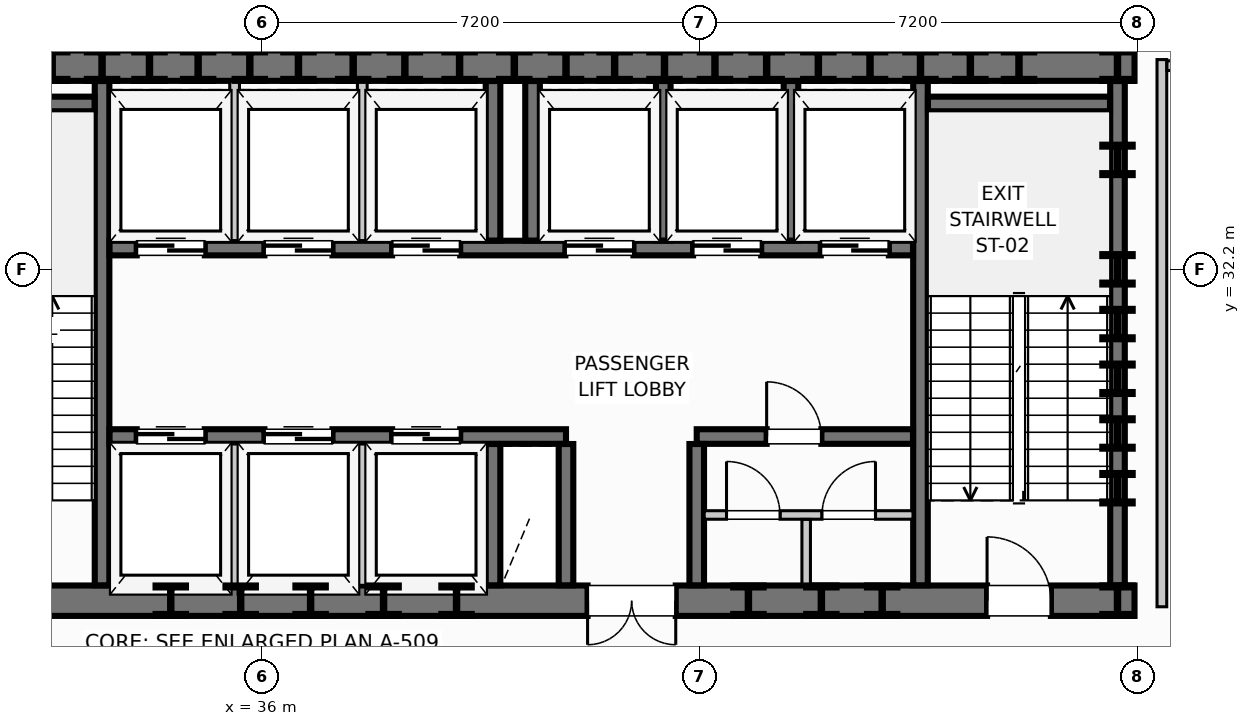
"""IFC4 building model, lengths in metres.
Left out: names, types, materials, properties, quantities, classifications, styles, units other than length and angle.
Written with IfcOpenShell. Run it as: python <this file> out.ifc"""

import sys

from ifc_helpers import new_model, si_unit, direction, frame, frame_2d, origin, origin_2d, place, context, subcontext, project, spatial, rectangle, i_section, extrude, element, fill, save


model = new_model("IFC4")
c1 = context("Model", 3, precision=1e-05, world=origin(), true_north=direction((0.0, 1.0)))
c2 = subcontext(c1, "Body", "Model", "MODEL_VIEW")
j1 = project(units=[si_unit("LENGTHUNIT", "METRE"), si_unit("PLANEANGLEUNIT", "RADIAN")], contexts=[c1])
p1 = place(None, origin())
s1 = spatial("IfcSite", under=j1, at=p1, CompositionType="ELEMENT")
p2 = place(p1, origin())
s2 = spatial("IfcBuilding", under=s1, at=p2, CompositionType="ELEMENT")
p3 = place(p2, frame((0.0, 0.0, 105.95)))
s3 = spatial("IfcBuildingStorey", under=s2, at=p3, CompositionType="ELEMENT", Elevation=105.95)
for number, where, z_axis, x_axis in (
    (1, (33.37, 35.55, 0.0), (0.0, 0.0, 1.0), (1.0, 0.0, 0.0)),
    (2, (34.95, 35.55, 0.0), (0.0, 0.0, 1.0), (1.0, 0.0, 0.0)),
    (3, (36.6, 35.55, 0.0), (0.0, 0.0, 1.0), (1.0, 0.0, 0.0)),
    (4, (38.35, 35.55, 0.0), (0.0, 0.0, 1.0), (1.0, 0.0, 0.0)),
    (5, (40.15, 35.55, 0.0), (0.0, 0.0, 1.0), (1.0, 0.0, 0.0)),
    (6, (41.8, 35.55, 0.0), (0.0, 0.0, 1.0), (1.0, 0.0, 0.0)),
    (7, (43.45, 35.55, 0.0), (0.0, 0.0, 1.0), (1.0, 0.0, 0.0)),
    (8, (45.15, 35.55, 0.0), (0.0, 0.0, 1.0), (1.0, 0.0, 0.0)),
    (9, (46.83, 35.55, 0.0), (0.0, 0.0, 1.0), (1.0, 0.0, 0.0)),
    (10, (48.45, 35.55, 0.0), (0.0, 0.0, 1.0), (1.0, 0.0, 0.0)),
    (11, (50.07, 35.55, 0.0), (0.0, 0.0, 1.0), (1.0, 0.0, 0.0)),
    (12, (34.5, 26.75, 0.0), (0.0, 0.0, 1.0), (1.0, 0.0, 0.0)),
    (13, (36.8, 26.75, 0.0), (0.0, 0.0, 1.0), (1.0, 0.0, 0.0)),
    (14, (39.2, 26.75, 0.0), (0.0, 0.0, 1.0), (1.0, 0.0, 0.0)),
    (15, (45.2, 26.75, 0.0), (0.0, 0.0, 1.0), (1.0, 0.0, 0.0)),
    (16, (50.07, 26.75, 0.0), (0.0, 0.0, 1.0), (1.0, 0.0, 0.0)),
    (17, (50.07, 28.6, 0.0), (0.0, 0.0, 1.0), (1.0, 0.0, 0.0)),
    (18, (50.07, 30.4, 0.0), (0.0, 0.0, 1.0), (1.0, 0.0, 0.0)),
    (19, (50.07, 32.2, 0.0), (0.0, 0.0, 1.0), (1.0, 0.0, 0.0)),
    (20, (50.07, 34.0, 0.0), (0.0, 0.0, 1.0), (1.0, 0.0, 0.0)),
    (21, (32.55, 35.55, 0.0), (0.0, 0.0, 1.0), (1.0, 0.0, 0.0)),
    (22, (37.5, 35.55, 0.0), (0.0, 0.0, 1.0), (1.0, 0.0, 0.0)),
    (23, (42.62, 35.55, 0.0), (0.0, 0.0, 1.0), (1.0, 0.0, 0.0)),
    (24, (47.65, 35.55, 0.0), (0.0, 0.0, 1.0), (1.0, 0.0, 0.0)),
    (25, (34.15, 35.55, 0.0), (0.0, 0.0, 1.0), (1.0, 0.0, 0.0)),
    (26, (35.8, 35.55, 0.0), (0.0, 0.0, 1.0), (1.0, 0.0, 0.0)),
    (27, (39.25, 35.55, 0.0), (0.0, 0.0, 1.0), (1.0, 0.0, 0.0)),
    (28, (41.0, 35.55, 0.0), (0.0, 0.0, 1.0), (1.0, 0.0, 0.0)),
    (29, (44.3, 35.55, 0.0), (0.0, 0.0, 1.0), (1.0, 0.0, 0.0)),
    (30, (46.0, 35.55, 0.0), (0.0, 0.0, 1.0), (1.0, 0.0, 0.0)),
    (31, (50.07, 29.5, 0.0), (0.0, 0.0, 1.0), (1.0, 0.0, 0.0)),
    (32, (50.07, 31.3, 0.0), (0.0, 0.0, 1.0), (1.0, 0.0, 0.0)),
    (33, (35.65, 26.75, 0.0), (0.0, 0.0, 1.0), (1.0, 0.0, 0.0)),
    (34, (38.0, 26.75, 0.0), (0.0, 0.0, 1.0), (1.0, 0.0, 0.0)),
    (35, (44.0, 26.75, 0.0), (0.0, 0.0, 1.0), (1.0, 0.0, 0.0)),
    (36, (46.2, 26.75, 0.0), (0.0, 0.0, 1.0), (1.0, 0.0, 0.0)),
):
    element("IfcColumn", number, at=place(p3, frame(where, z_axis=z_axis, x_axis=x_axis)), inside=s3, PredefinedType="COLUMN", context=c2, shape_type="SweptSolid", body=[
        extrude(i_section(OverallWidth=0.5, OverallDepth=0.5, WebThickness=0.022, FlangeThickness=0.032, at=origin_2d()), origin(), (0.0, 0.0, 1.0), 4.5),
    ])
p4 = place(p3, frame((21.65, 26.75, 0.0), z_axis=(0.0, 0.0, 1.0), x_axis=(1.0, 0.0, 0.0)))
e37 = element("IfcWall", 37, at=p4, inside=s3, PredefinedType="SHEAR", context=c2, shape_type="SweptSolid", body=[
    extrude(rectangle(XDim=28.7, YDim=0.5, at=frame_2d((14.35, 0.0))), origin(), (0.0, 0.0, 1.0), 4.5),
])
p5 = place(p4, frame((1.375, 0.0, 0.0)))
e38 = element("IfcOpeningElement", 38, at=p5, cuts=e37, PredefinedType="OPENING", context=c2, shape_type="SweptSolid", body=[
    extrude(rectangle(XDim=1.05, YDim=2.0, at=frame_2d((0.525, 1.0))), frame((0.0, 0.26, 0.0), z_axis=(0.0, -1.0, 0.0), x_axis=(1.0, 0.0, 0.0)), (0.0, 0.0, 1.0), 0.52),
])
p6 = place(p4, frame((5.375, 0.0, 0.0)))
e39 = element("IfcOpeningElement", 39, at=p6, cuts=e37, PredefinedType="OPENING", context=c2, shape_type="SweptSolid", body=[
    extrude(rectangle(XDim=1.05, YDim=2.0, at=frame_2d((0.525, 1.0))), frame((0.0, 0.26, 0.0), z_axis=(0.0, -1.0, 0.0), x_axis=(1.0, 0.0, 0.0)), (0.0, 0.0, 1.0), 0.52),
])
p7 = place(p4, frame((9.575, 0.0, 0.0)))
e40 = element("IfcOpeningElement", 40, at=p7, cuts=e37, PredefinedType="OPENING", context=c2, shape_type="SweptSolid", body=[
    extrude(rectangle(XDim=1.05, YDim=2.0, at=frame_2d((0.525, 1.0))), frame((0.0, 0.26, 0.0), z_axis=(0.0, -1.0, 0.0), x_axis=(1.0, 0.0, 0.0)), (0.0, 0.0, 1.0), 0.52),
])
p8 = place(p4, frame((19.705, 0.0, 0.0)))
e41 = element("IfcOpeningElement", 41, at=p8, cuts=e37, PredefinedType="OPENING", context=c2, shape_type="SweptSolid", body=[
    extrude(rectangle(XDim=1.45, YDim=2.0, at=frame_2d((0.725, 1.0))), frame((0.0, 0.26, 0.0), z_axis=(0.0, -1.0, 0.0), x_axis=(1.0, 0.0, 0.0)), (0.0, 0.0, 1.0), 0.52),
])
p9 = place(p4, frame((26.275, 0.0, 0.0)))
e42 = element("IfcOpeningElement", 42, at=p9, cuts=e37, PredefinedType="OPENING", context=c2, shape_type="SweptSolid", body=[
    extrude(rectangle(XDim=1.05, YDim=2.0, at=frame_2d((0.525, 1.0))), frame((0.0, 0.26, 0.0), z_axis=(0.0, -1.0, 0.0), x_axis=(1.0, 0.0, 0.0)), (0.0, 0.0, 1.0), 0.52),
])
p10 = place(p3, frame((50.35, 35.55, 0.0), z_axis=(0.0, 0.0, 1.0), x_axis=(-1.0, 0.0, 0.0)))
e43 = element("IfcWall", 43, at=p10, inside=s3, PredefinedType="SHEAR", context=c2, shape_type="SweptSolid", body=[
    extrude(rectangle(XDim=28.7, YDim=0.5, at=frame_2d((14.35, 0.0))), origin(), (0.0, 0.0, 1.0), 4.5),
])
for number, where, z_axis, x_axis in (
    (44, (50.07, 27.003, 0.0), (0.0, 0.0, 1.0), (0.0, 1.0, 0.0)),
    (45, (33.37, 27.003, 0.0), (0.0, 0.0, 1.0), (0.0, 1.0, 0.0)),
):
    element("IfcWall", number, at=place(p3, frame(where, z_axis=z_axis, x_axis=x_axis)), inside=s3, PredefinedType="SHEAR", context=c2, shape_type="SweptSolid", body=[
        extrude(rectangle(XDim=8.294, YDim=0.24, at=frame_2d((4.147, 0.0))), origin(), (0.0, 0.0, 1.0), 4.5),
    ])
p11 = place(p3, frame((30.253, 34.92, 0.0), z_axis=(0.0, 0.0, 1.0), x_axis=(1.0, 0.0, 0.0)))
e46 = element("IfcWall", 46, at=p11, inside=s3, PredefinedType="SHEAR", context=c2, shape_type="SweptSolid", body=[
    extrude(rectangle(XDim=2.994, YDim=0.24, at=frame_2d((1.497, 0.0))), origin(), (0.0, 0.0, 1.0), 4.5),
])
p12 = place(p3, frame((46.83, 27.003, 0.0), z_axis=(0.0, 0.0, 1.0), x_axis=(0.0, 1.0, 0.0)))
e47 = element("IfcWall", 47, at=p12, inside=s3, PredefinedType="SHEAR", context=c2, shape_type="SweptSolid", body=[
    extrude(rectangle(XDim=8.294, YDim=0.24, at=frame_2d((4.147, 0.0))), origin(), (0.0, 0.0, 1.0), 4.5),
])
p13 = place(p3, frame((46.953, 34.92, 0.0), z_axis=(0.0, 0.0, 1.0), x_axis=(1.0, 0.0, 0.0)))
e48 = element("IfcWall", 48, at=p13, inside=s3, PredefinedType="SHEAR", context=c2, shape_type="SweptSolid", body=[
    extrude(rectangle(XDim=2.994, YDim=0.24, at=frame_2d((1.497, 0.0))), origin(), (0.0, 0.0, 1.0), 4.5),
])
p14 = place(p3, frame((33.493, 32.55, 0.0), z_axis=(0.0, 0.0, 1.0), x_axis=(1.0, 0.0, 0.0)))
e49 = element("IfcWall", 49, at=p14, inside=s3, PredefinedType="SHEAR", context=c2, shape_type="SweptSolid", body=[
    extrude(rectangle(XDim=13.214, YDim=0.24, at=frame_2d((6.607, 0.0))), origin(), (0.0, 0.0, 1.0), 4.5),
])
p15 = place(p14, frame((0.447, 0.0, 0.0)))
e50 = element("IfcOpeningElement", 50, at=p15, cuts=e49, PredefinedType="OPENING", context=c2, shape_type="SweptSolid", body=[
    extrude(rectangle(XDim=1.12, YDim=2.0, at=frame_2d((0.56, 1.0))), frame((0.0, 0.13, 0.0), z_axis=(0.0, -1.0, 0.0), x_axis=(1.0, 0.0, 0.0)), (0.0, 0.0, 1.0), 0.26),
])
p16 = place(p14, frame((2.547, 0.0, 0.0)))
e51 = element("IfcOpeningElement", 51, at=p16, cuts=e49, PredefinedType="OPENING", context=c2, shape_type="SweptSolid", body=[
    extrude(rectangle(XDim=1.12, YDim=2.0, at=frame_2d((0.56, 1.0))), frame((0.0, 0.13, 0.0), z_axis=(0.0, -1.0, 0.0), x_axis=(1.0, 0.0, 0.0)), (0.0, 0.0, 1.0), 0.26),
])
p17 = place(p14, frame((4.647, 0.0, 0.0)))
e52 = element("IfcOpeningElement", 52, at=p17, cuts=e49, PredefinedType="OPENING", context=c2, shape_type="SweptSolid", body=[
    extrude(rectangle(XDim=1.12, YDim=2.0, at=frame_2d((0.56, 1.0))), frame((0.0, 0.13, 0.0), z_axis=(0.0, -1.0, 0.0), x_axis=(1.0, 0.0, 0.0)), (0.0, 0.0, 1.0), 0.26),
])
p18 = place(p14, frame((7.497, 0.0, 0.0)))
e53 = element("IfcOpeningElement", 53, at=p18, cuts=e49, PredefinedType="OPENING", context=c2, shape_type="SweptSolid", body=[
    extrude(rectangle(XDim=1.12, YDim=2.0, at=frame_2d((0.56, 1.0))), frame((0.0, 0.13, 0.0), z_axis=(0.0, -1.0, 0.0), x_axis=(1.0, 0.0, 0.0)), (0.0, 0.0, 1.0), 0.26),
])
p19 = place(p14, frame((9.597, 0.0, 0.0)))
e54 = element("IfcOpeningElement", 54, at=p19, cuts=e49, PredefinedType="OPENING", context=c2, shape_type="SweptSolid", body=[
    extrude(rectangle(XDim=1.12, YDim=2.0, at=frame_2d((0.56, 1.0))), frame((0.0, 0.13, 0.0), z_axis=(0.0, -1.0, 0.0), x_axis=(1.0, 0.0, 0.0)), (0.0, 0.0, 1.0), 0.26),
])
p20 = place(p14, frame((11.697, 0.0, 0.0)))
e55 = element("IfcOpeningElement", 55, at=p20, cuts=e49, PredefinedType="OPENING", context=c2, shape_type="SweptSolid", body=[
    extrude(rectangle(XDim=1.12, YDim=2.0, at=frame_2d((0.56, 1.0))), frame((0.0, 0.13, 0.0), z_axis=(0.0, -1.0, 0.0), x_axis=(1.0, 0.0, 0.0)), (0.0, 0.0, 1.0), 0.26),
])
p21 = place(p3, frame((33.493, 29.45, 0.0), z_axis=(0.0, 0.0, 1.0), x_axis=(1.0, 0.0, 0.0)))
e56 = element("IfcWall", 56, at=p21, inside=s3, PredefinedType="SHEAR", context=c2, shape_type="SweptSolid", body=[
    extrude(rectangle(XDim=7.507, YDim=0.24, at=frame_2d((3.753, 0.0))), origin(), (0.0, 0.0, 1.0), 4.5),
])
p22 = place(p21, frame((0.447, 0.0, 0.0)))
e57 = element("IfcOpeningElement", 57, at=p22, cuts=e56, PredefinedType="OPENING", context=c2, shape_type="SweptSolid", body=[
    extrude(rectangle(XDim=1.12, YDim=2.0, at=frame_2d((0.56, 1.0))), frame((0.0, 0.13, 0.0), z_axis=(0.0, -1.0, 0.0), x_axis=(1.0, 0.0, 0.0)), (0.0, 0.0, 1.0), 0.26),
])
p23 = place(p21, frame((2.547, 0.0, 0.0)))
e58 = element("IfcOpeningElement", 58, at=p23, cuts=e56, PredefinedType="OPENING", context=c2, shape_type="SweptSolid", body=[
    extrude(rectangle(XDim=1.12, YDim=2.0, at=frame_2d((0.56, 1.0))), frame((0.0, 0.13, 0.0), z_axis=(0.0, -1.0, 0.0), x_axis=(1.0, 0.0, 0.0)), (0.0, 0.0, 1.0), 0.26),
])
p24 = place(p21, frame((4.647, 0.0, 0.0)))
e59 = element("IfcOpeningElement", 59, at=p24, cuts=e56, PredefinedType="OPENING", context=c2, shape_type="SweptSolid", body=[
    extrude(rectangle(XDim=1.12, YDim=2.0, at=frame_2d((0.56, 1.0))), frame((0.0, 0.13, 0.0), z_axis=(0.0, -1.0, 0.0), x_axis=(1.0, 0.0, 0.0)), (0.0, 0.0, 1.0), 0.26),
])
p25 = place(p3, frame((43.15, 29.45, 0.0), z_axis=(0.0, 0.0, 1.0), x_axis=(1.0, 0.0, 0.0)))
e60 = element("IfcWall", 60, at=p25, inside=s3, PredefinedType="SHEAR", context=c2, shape_type="SweptSolid", body=[
    extrude(rectangle(XDim=3.557, YDim=0.24, at=frame_2d((1.779, 0.0))), origin(), (0.0, 0.0, 1.0), 4.5),
])
p26 = place(p25, frame((1.15, 0.0, 0.0)))
e61 = element("IfcOpeningElement", 61, at=p26, cuts=e60, PredefinedType="OPENING", context=c2, shape_type="SweptSolid", body=[
    extrude(rectangle(XDim=0.9, YDim=2.0, at=frame_2d((0.45, 1.0))), frame((0.0, 0.13, 0.0), z_axis=(0.0, -1.0, 0.0), x_axis=(1.0, 0.0, 0.0)), (0.0, 0.0, 1.0), 0.26),
])
for number, where, z_axis, x_axis in (
    (62, (41.0, 27.003, 0.0), (0.0, 0.0, 1.0), (0.0, 1.0, 0.0)),
    (63, (43.15, 27.003, 0.0), (0.0, 0.0, 1.0), (0.0, 1.0, 0.0)),
):
    element("IfcWall", number, at=place(p3, frame(where, z_axis=z_axis, x_axis=x_axis)), inside=s3, PredefinedType="SHEAR", context=c2, shape_type="SweptSolid", body=[
        extrude(rectangle(XDim=2.324, YDim=0.24, at=frame_2d((1.162, 0.0))), origin(), (0.0, 0.0, 1.0), 4.5),
    ])
for number, where, z_axis, x_axis in (
    (64, (39.8, 32.673, 0.0), (0.0, 0.0, 1.0), (0.0, 1.0, 0.0)),
    (65, (40.45, 32.673, 0.0), (0.0, 0.0, 1.0), (0.0, 1.0, 0.0)),
    (66, (42.6, 32.673, 0.0), (0.0, 0.0, 1.0), (0.0, 1.0, 0.0)),
    (67, (44.7, 32.673, 0.0), (0.0, 0.0, 1.0), (0.0, 1.0, 0.0)),
):
    element("IfcWall", number, at=place(p3, frame(where, z_axis=z_axis, x_axis=x_axis)), inside=s3, PredefinedType="SHEAR", context=c2, shape_type="SweptSolid", body=[
        extrude(rectangle(XDim=2.624, YDim=0.24, at=frame_2d((1.312, 0.0))), origin(), (0.0, 0.0, 1.0), 4.5),
    ])
p27 = place(p3, frame((39.8, 27.003, 0.0), z_axis=(0.0, 0.0, 1.0), x_axis=(0.0, 1.0, 0.0)))
e68 = element("IfcWall", 68, at=p27, inside=s3, PredefinedType="SHEAR", context=c2, shape_type="SweptSolid", body=[
    extrude(rectangle(XDim=2.324, YDim=0.24, at=frame_2d((1.162, 0.0))), origin(), (0.0, 0.0, 1.0), 4.5),
])
for number, where, z_axis, x_axis in (
    (69, (35.55, 32.673, 0.0), (0.0, 0.0, 1.0), (0.0, 1.0, 0.0)),
    (70, (37.65, 32.673, 0.0), (0.0, 0.0, 1.0), (0.0, 1.0, 0.0)),
):
    element("IfcWall", number, at=place(p3, frame(where, z_axis=z_axis, x_axis=x_axis)), inside=s3, PredefinedType="MOVABLE", context=c2, shape_type="SweptSolid", body=[
        extrude(rectangle(XDim=2.624, YDim=0.16, at=frame_2d((1.312, 0.0))), origin(), (0.0, 0.0, 1.0), 4.245),
    ])
for number, where, z_axis, x_axis in (
    (71, (35.55, 27.003, 0.0), (0.0, 0.0, 1.0), (0.0, 1.0, 0.0)),
    (72, (37.65, 27.003, 0.0), (0.0, 0.0, 1.0), (0.0, 1.0, 0.0)),
):
    element("IfcWall", number, at=place(p3, frame(where, z_axis=z_axis, x_axis=x_axis)), inside=s3, PredefinedType="MOVABLE", context=c2, shape_type="SweptSolid", body=[
        extrude(rectangle(XDim=2.324, YDim=0.16, at=frame_2d((1.162, 0.0))), origin(), (0.0, 0.0, 1.0), 4.245),
    ])
p28 = place(p3, frame((43.273, 28.16, 0.0), z_axis=(0.0, 0.0, 1.0), x_axis=(1.0, 0.0, 0.0)))
e73 = element("IfcWall", 73, at=p28, inside=s3, PredefinedType="PARTITIONING", context=c2, shape_type="SweptSolid", body=[
    extrude(rectangle(XDim=3.434, YDim=0.14, at=frame_2d((1.717, 0.0))), origin(), (0.0, 0.0, 1.0), 4.245),
])
p29 = place(p28, frame((0.367, 0.0, 0.0)))
e74 = element("IfcOpeningElement", 74, at=p29, cuts=e73, PredefinedType="OPENING", context=c2, shape_type="SweptSolid", body=[
    extrude(rectangle(XDim=0.88, YDim=2.02, at=frame_2d((0.44, 1.01))), frame((0.0, 0.08, 0.0), z_axis=(0.0, -1.0, 0.0), x_axis=(1.0, 0.0, 0.0)), (0.0, 0.0, 1.0), 0.16),
])
p30 = place(p28, frame((1.937, 0.0, 0.0)))
e75 = element("IfcOpeningElement", 75, at=p30, cuts=e73, PredefinedType="OPENING", context=c2, shape_type="SweptSolid", body=[
    extrude(rectangle(XDim=0.88, YDim=2.02, at=frame_2d((0.44, 1.01))), frame((0.0, 0.08, 0.0), z_axis=(0.0, -1.0, 0.0), x_axis=(1.0, 0.0, 0.0)), (0.0, 0.0, 1.0), 0.16),
])
p31 = place(p3, frame((44.95, 27.003, 0.0), z_axis=(0.0, 0.0, 1.0), x_axis=(0.0, 1.0, 0.0)))
e76 = element("IfcWall", 76, at=p31, inside=s3, PredefinedType="PARTITIONING", context=c2, shape_type="SweptSolid", body=[
    extrude(rectangle(XDim=1.084, YDim=0.14, at=frame_2d((0.542, 0.0))), origin(), (0.0, 0.0, 1.0), 4.245),
])
p32 = place(p3, frame((50.8, 26.65, 0.0), z_axis=(0.0, 0.0, 1.0), x_axis=(0.0, 1.0, 0.0)))
e77 = element("IfcWall", 77, at=p32, inside=s3, PredefinedType="PARTITIONING", context=c2, shape_type="SweptSolid", body=[
    extrude(rectangle(XDim=9.0, YDim=0.16, at=frame_2d((4.5, 0.0))), origin(), (0.0, 0.0, 1.0), 4.245),
])
p33 = place(p3, frame((50.883, 35.55, 0.0), z_axis=(0.0, 0.0, 1.0), x_axis=(1.0, 0.0, 0.0)))
e78 = element("IfcWall", 78, at=p33, inside=s3, PredefinedType="PARTITIONING", context=c2, shape_type="SweptSolid", body=[
    extrude(rectangle(XDim=2.234, YDim=0.16, at=frame_2d((1.117, 0.0))), origin(), (0.0, 0.0, 1.0), 4.245),
])
p34 = place(p26, origin())
e79 = element("IfcDoor", 79, at=p34, inside=s3, OperationType="SINGLE_SWING_LEFT", PredefinedType="DOOR", context=c2, shape_type="SweptSolid", body=[
    extrude(rectangle(XDim=0.9, YDim=2.0, at=frame_2d((0.45, 1.0))), frame((0.0, 0.025, 0.0), z_axis=(0.0, -1.0, 0.0), x_axis=(1.0, 0.0, 0.0)), (0.0, 0.0, 1.0), 0.05),
])
fill(e61, e79)
p35 = place(p29, origin())
e80 = element("IfcDoor", 80, at=p35, inside=s3, OperationType="SINGLE_SWING_LEFT", PredefinedType="DOOR", context=c2, shape_type="SweptSolid", body=[
    extrude(rectangle(XDim=0.88, YDim=2.02, at=frame_2d((0.44, 1.01))), frame((0.0, 0.025, 0.0), z_axis=(0.0, -1.0, 0.0), x_axis=(1.0, 0.0, 0.0)), (0.0, 0.0, 1.0), 0.05),
])
fill(e74, e80)
p36 = place(p30, origin())
e81 = element("IfcDoor", 81, at=p36, inside=s3, OperationType="SINGLE_SWING_RIGHT", PredefinedType="DOOR", context=c2, shape_type="SweptSolid", body=[
    extrude(rectangle(XDim=0.88, YDim=2.02, at=frame_2d((0.44, 1.01))), frame((0.0, 0.025, 0.0), z_axis=(0.0, -1.0, 0.0), x_axis=(1.0, 0.0, 0.0)), (0.0, 0.0, 1.0), 0.05),
])
fill(e75, e81)
p37 = place(p8, frame((1.45, 0.0, 0.0), z_axis=(0.0, 0.0, 1.0), x_axis=(-1.0, 0.0, 0.0)))
e82 = element("IfcDoor", 82, at=p37, inside=s3, OperationType="DOUBLE_DOOR_SINGLE_SWING", PredefinedType="DOOR", context=c2, shape_type="SweptSolid", body=[
    extrude(rectangle(XDim=1.45, YDim=2.0, at=frame_2d((0.725, 1.0))), frame((0.0, 0.025, 0.0), z_axis=(0.0, -1.0, 0.0), x_axis=(1.0, 0.0, 0.0)), (0.0, 0.0, 1.0), 0.05),
])
fill(e41, e82)
p38 = place(p9, origin())
e83 = element("IfcDoor", 83, at=p38, inside=s3, OperationType="SINGLE_SWING_LEFT", PredefinedType="DOOR", context=c2, shape_type="SweptSolid", body=[
    extrude(rectangle(XDim=1.05, YDim=2.0, at=frame_2d((0.525, 1.0))), frame((0.0, 0.025, 0.0), z_axis=(0.0, -1.0, 0.0), x_axis=(1.0, 0.0, 0.0)), (0.0, 0.0, 1.0), 0.05),
])
fill(e42, e83)
p39 = place(p15, origin())
e84 = element("IfcDoor", 84, at=p39, inside=s3, OperationType="DOUBLE_DOOR_SLIDING", PredefinedType="USERDEFINED", context=c2, shape_type="SweptSolid", body=[
    extrude(rectangle(XDim=1.12, YDim=2.0, at=frame_2d((0.56, 1.0))), frame((0.0, 0.025, 0.0), z_axis=(0.0, -1.0, 0.0), x_axis=(1.0, 0.0, 0.0)), (0.0, 0.0, 1.0), 0.05),
])
fill(e50, e84)
p40 = place(p16, origin())
e85 = element("IfcDoor", 85, at=p40, inside=s3, OperationType="DOUBLE_DOOR_SLIDING", PredefinedType="USERDEFINED", context=c2, shape_type="SweptSolid", body=[
    extrude(rectangle(XDim=1.12, YDim=2.0, at=frame_2d((0.56, 1.0))), frame((0.0, 0.025, 0.0), z_axis=(0.0, -1.0, 0.0), x_axis=(1.0, 0.0, 0.0)), (0.0, 0.0, 1.0), 0.05),
])
fill(e51, e85)
p41 = place(p17, origin())
e86 = element("IfcDoor", 86, at=p41, inside=s3, OperationType="DOUBLE_DOOR_SLIDING", PredefinedType="USERDEFINED", context=c2, shape_type="SweptSolid", body=[
    extrude(rectangle(XDim=1.12, YDim=2.0, at=frame_2d((0.56, 1.0))), frame((0.0, 0.025, 0.0), z_axis=(0.0, -1.0, 0.0), x_axis=(1.0, 0.0, 0.0)), (0.0, 0.0, 1.0), 0.05),
])
fill(e52, e86)
p42 = place(p22, origin())
e87 = element("IfcDoor", 87, at=p42, inside=s3, OperationType="DOUBLE_DOOR_SLIDING", PredefinedType="USERDEFINED", context=c2, shape_type="SweptSolid", body=[
    extrude(rectangle(XDim=1.12, YDim=2.0, at=frame_2d((0.56, 1.0))), frame((0.0, 0.025, 0.0), z_axis=(0.0, -1.0, 0.0), x_axis=(1.0, 0.0, 0.0)), (0.0, 0.0, 1.0), 0.05),
])
fill(e57, e87)
p43 = place(p23, origin())
e88 = element("IfcDoor", 88, at=p43, inside=s3, OperationType="DOUBLE_DOOR_SLIDING", PredefinedType="USERDEFINED", context=c2, shape_type="SweptSolid", body=[
    extrude(rectangle(XDim=1.12, YDim=2.0, at=frame_2d((0.56, 1.0))), frame((0.0, 0.025, 0.0), z_axis=(0.0, -1.0, 0.0), x_axis=(1.0, 0.0, 0.0)), (0.0, 0.0, 1.0), 0.05),
])
fill(e58, e88)
p44 = place(p24, origin())
e89 = element("IfcDoor", 89, at=p44, inside=s3, OperationType="DOUBLE_DOOR_SLIDING", PredefinedType="USERDEFINED", context=c2, shape_type="SweptSolid", body=[
    extrude(rectangle(XDim=1.12, YDim=2.0, at=frame_2d((0.56, 1.0))), frame((0.0, 0.025, 0.0), z_axis=(0.0, -1.0, 0.0), x_axis=(1.0, 0.0, 0.0)), (0.0, 0.0, 1.0), 0.05),
])
fill(e59, e89)
p45 = place(p18, origin())
e90 = element("IfcDoor", 90, at=p45, inside=s3, OperationType="DOUBLE_DOOR_SLIDING", PredefinedType="USERDEFINED", context=c2, shape_type="SweptSolid", body=[
    extrude(rectangle(XDim=1.12, YDim=2.0, at=frame_2d((0.56, 1.0))), frame((0.0, 0.025, 0.0), z_axis=(0.0, -1.0, 0.0), x_axis=(1.0, 0.0, 0.0)), (0.0, 0.0, 1.0), 0.05),
])
fill(e53, e90)
p46 = place(p19, origin())
e91 = element("IfcDoor", 91, at=p46, inside=s3, OperationType="DOUBLE_DOOR_SLIDING", PredefinedType="USERDEFINED", context=c2, shape_type="SweptSolid", body=[
    extrude(rectangle(XDim=1.12, YDim=2.0, at=frame_2d((0.56, 1.0))), frame((0.0, 0.025, 0.0), z_axis=(0.0, -1.0, 0.0), x_axis=(1.0, 0.0, 0.0)), (0.0, 0.0, 1.0), 0.05),
])
fill(e54, e91)
p47 = place(p20, origin())
e92 = element("IfcDoor", 92, at=p47, inside=s3, OperationType="DOUBLE_DOOR_SLIDING", PredefinedType="USERDEFINED", context=c2, shape_type="SweptSolid", body=[
    extrude(rectangle(XDim=1.12, YDim=2.0, at=frame_2d((0.56, 1.0))), frame((0.0, 0.025, 0.0), z_axis=(0.0, -1.0, 0.0), x_axis=(1.0, 0.0, 0.0)), (0.0, 0.0, 1.0), 0.05),
])
fill(e55, e92)
save(model, sys.argv[1])
